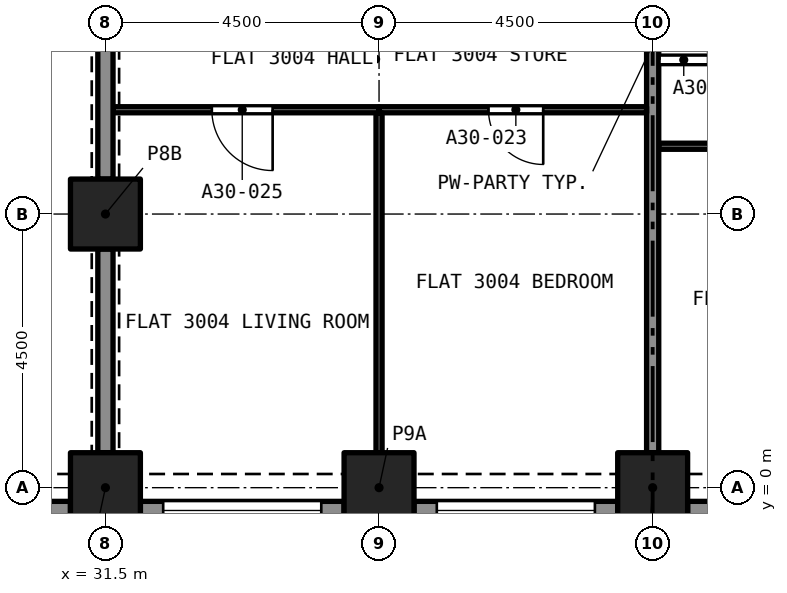
"""IFC4 building model, lengths in metres.
Left out: names, types, materials, properties, quantities, classifications, styles, units other than length and angle.
Written with IfcOpenShell. Run it as: python <this file> out.ifc"""

import sys

from ifc_helpers import new_model, si_unit, direction, frame, frame_2d, origin, origin_2d, place, context, subcontext, project, spatial, rectangle, extrude, element, fill, save


model = new_model("IFC4")
c1 = context("Model", 3, precision=1e-05, world=origin(), true_north=direction((0.0, 1.0)))
c2 = subcontext(c1, "Body", "Model", "MODEL_VIEW")
j1 = project(units=[si_unit("LENGTHUNIT", "METRE"), si_unit("PLANEANGLEUNIT", "RADIAN")], contexts=[c1])
p1 = place(None, origin())
s1 = spatial("IfcSite", under=j1, at=p1, CompositionType="ELEMENT")
p2 = place(p1, origin())
s2 = spatial("IfcBuilding", under=s1, at=p2, CompositionType="ELEMENT")
p3 = place(p2, frame((0.0, 0.0, 108.8)))
s3 = spatial("IfcBuildingStorey", under=s2, at=p3, CompositionType="ELEMENT", Elevation=108.8)
for number, where, z_axis, x_axis in (
    (1, (31.5, 0.0, 0.0), (0.0, 0.0, 1.0), (1.0, 0.0, 0.0)),
    (2, (36.0, 0.0, 0.0), (0.0, 0.0, 1.0), (1.0, 0.0, 0.0)),
    (3, (40.5, 0.0, 0.0), (0.0, 0.0, 1.0), (1.0, 0.0, 0.0)),
    (4, (31.5, 4.5, 0.0), (0.0, 0.0, 1.0), (1.0, 0.0, 0.0)),
):
    element("IfcColumn", number, at=place(p3, frame(where, z_axis=z_axis, x_axis=x_axis)), inside=s3, PredefinedType="COLUMN", context=c2, shape_type="SweptSolid", body=[
        extrude(rectangle(XDim=1.15, YDim=1.15, at=origin_2d()), origin(), (0.0, 0.0, 1.0), 3.2),
    ])
p4 = place(p3, frame((30.925, -0.375, 0.0), z_axis=(0.0, 0.0, 1.0), x_axis=(-1.0, 0.0, 0.0)))
e5 = element("IfcWall", 5, at=p4, inside=s3, PredefinedType="SOLIDWALL", context=c2, shape_type="SweptSolid", body=[
    extrude(rectangle(XDim=3.35, YDim=0.3, at=frame_2d((1.675, 0.0))), origin(), (0.0, 0.0, 1.0), 3.2),
])
p5 = place(p4, frame((0.375, 0.0, 0.45)))
e6 = element("IfcOpeningElement", 6, at=p5, cuts=e5, PredefinedType="OPENING", context=c2, shape_type="SweptSolid", body=[
    extrude(rectangle(XDim=2.6, YDim=1.95, at=frame_2d((1.3, 0.975))), frame((0.0, 0.16, 0.0), z_axis=(0.0, -1.0, 0.0), x_axis=(1.0, 0.0, 0.0)), (0.0, 0.0, 1.0), 0.32),
])
p6 = place(p3, frame((35.425, -0.375, 0.0), z_axis=(0.0, 0.0, 1.0), x_axis=(-1.0, 0.0, 0.0)))
e7 = element("IfcWall", 7, at=p6, inside=s3, PredefinedType="SOLIDWALL", context=c2, shape_type="SweptSolid", body=[
    extrude(rectangle(XDim=3.35, YDim=0.3, at=frame_2d((1.675, 0.0))), origin(), (0.0, 0.0, 1.0), 3.2),
])
p7 = place(p6, frame((0.375, 0.0, 0.45)))
e8 = element("IfcOpeningElement", 8, at=p7, cuts=e7, PredefinedType="OPENING", context=c2, shape_type="SweptSolid", body=[
    extrude(rectangle(XDim=2.6, YDim=1.95, at=frame_2d((1.3, 0.975))), frame((0.0, 0.16, 0.0), z_axis=(0.0, -1.0, 0.0), x_axis=(1.0, 0.0, 0.0)), (0.0, 0.0, 1.0), 0.32),
])
p8 = place(p3, frame((39.925, -0.375, 0.0), z_axis=(0.0, 0.0, 1.0), x_axis=(-1.0, 0.0, 0.0)))
e9 = element("IfcWall", 9, at=p8, inside=s3, PredefinedType="SOLIDWALL", context=c2, shape_type="SweptSolid", body=[
    extrude(rectangle(XDim=3.35, YDim=0.3, at=frame_2d((1.675, 0.0))), origin(), (0.0, 0.0, 1.0), 3.2),
])
p9 = place(p8, frame((0.375, 0.0, 0.45)))
e10 = element("IfcOpeningElement", 10, at=p9, cuts=e9, PredefinedType="OPENING", context=c2, shape_type="SweptSolid", body=[
    extrude(rectangle(XDim=2.6, YDim=1.95, at=frame_2d((1.3, 0.975))), frame((0.0, 0.16, 0.0), z_axis=(0.0, -1.0, 0.0), x_axis=(1.0, 0.0, 0.0)), (0.0, 0.0, 1.0), 0.32),
])
p10 = place(p3, frame((44.425, -0.375, 0.0), z_axis=(0.0, 0.0, 1.0), x_axis=(-1.0, 0.0, 0.0)))
e11 = element("IfcWall", 11, at=p10, inside=s3, PredefinedType="SOLIDWALL", context=c2, shape_type="SweptSolid", body=[
    extrude(rectangle(XDim=3.35, YDim=0.3, at=frame_2d((1.675, 0.0))), origin(), (0.0, 0.0, 1.0), 3.2),
])
p11 = place(p10, frame((0.375, 0.0, 0.45)))
e12 = element("IfcOpeningElement", 12, at=p11, cuts=e11, PredefinedType="OPENING", context=c2, shape_type="SweptSolid", body=[
    extrude(rectangle(XDim=2.6, YDim=1.95, at=frame_2d((1.3, 0.975))), frame((0.0, 0.16, 0.0), z_axis=(0.0, -1.0, 0.0), x_axis=(1.0, 0.0, 0.0)), (0.0, 0.0, 1.0), 0.32),
])
p12 = place(p3, frame((40.6, 7.035, 0.0), z_axis=(0.0, 0.0, 1.0), x_axis=(1.0, 0.0, 0.0)))
e13 = element("IfcWall", 13, at=p12, inside=s3, PredefinedType="PARTITIONING", context=c2, shape_type="SweptSolid", body=[
    extrude(rectangle(XDim=0.923, YDim=0.125, at=frame_2d((0.461, 0.0))), origin(), (0.0, 0.0, 1.0), 2.9),
])
p13 = place(p12, frame((0.011, 0.0, 0.0)))
e14 = element("IfcOpeningElement", 14, at=p13, cuts=e13, PredefinedType="OPENING", context=c2, shape_type="SweptSolid", body=[
    extrude(rectangle(XDim=0.8, YDim=2.1, at=frame_2d((0.4, 1.05))), frame((0.0, 0.073, 0.0), z_axis=(0.0, -1.0, 0.0), x_axis=(1.0, 0.0, 0.0)), (0.0, 0.0, 1.0), 0.145),
])
p14 = place(p3, frame((44.95, 5.615, 0.0), z_axis=(0.0, 0.0, 1.0), x_axis=(-1.0, 0.0, 0.0)))
e15 = element("IfcWall", 15, at=p14, inside=s3, PredefinedType="PARTITIONING", context=c2, shape_type="SweptSolid", body=[
    extrude(rectangle(XDim=4.35, YDim=0.1, at=frame_2d((2.175, 0.0))), origin(), (0.0, 0.0, 1.0), 2.9),
])
p15 = place(p14, frame((1.75, 0.0, 0.0)))
e16 = element("IfcOpeningElement", 16, at=p15, cuts=e15, PredefinedType="OPENING", context=c2, shape_type="SweptSolid", body=[
    extrude(rectangle(XDim=0.9, YDim=2.1, at=frame_2d((0.45, 1.05))), frame((0.0, 0.06, 0.0), z_axis=(0.0, -1.0, 0.0), x_axis=(1.0, 0.0, 0.0)), (0.0, 0.0, 1.0), 0.12),
])
p16 = place(p3, frame((40.5, 0.575, 0.0), z_axis=(0.0, 0.0, 1.0), x_axis=(0.0, 1.0, 0.0)))
e17 = element("IfcWall", 17, at=p16, inside=s3, PredefinedType="PARTITIONING", context=c2, shape_type="SweptSolid", body=[
    extrude(rectangle(XDim=13.425, YDim=0.2, at=frame_2d((6.712, 0.0))), origin(), (0.0, 0.0, 1.0), 2.9),
])
p17 = place(p3, frame((40.4, 6.215, 0.0), z_axis=(0.0, 0.0, 1.0), x_axis=(-1.0, 0.0, 0.0)))
e18 = element("IfcWall", 18, at=p17, inside=s3, PredefinedType="PARTITIONING", context=c2, shape_type="SweptSolid", body=[
    extrude(rectangle(XDim=4.4, YDim=0.1, at=frame_2d((2.2, 0.0))), origin(), (0.0, 0.0, 1.0), 2.9),
])
p18 = place(p17, frame((1.7, 0.0, 0.0)))
e19 = element("IfcOpeningElement", 19, at=p18, cuts=e18, PredefinedType="OPENING", context=c2, shape_type="SweptSolid", body=[
    extrude(rectangle(XDim=0.9, YDim=2.1, at=frame_2d((0.45, 1.05))), frame((0.0, 0.06, 0.0), z_axis=(0.0, -1.0, 0.0), x_axis=(1.0, 0.0, 0.0)), (0.0, 0.0, 1.0), 0.12),
])
p19 = place(p3, frame((36.0, 0.575, 0.0), z_axis=(0.0, 0.0, 1.0), x_axis=(0.0, 1.0, 0.0)))
e20 = element("IfcWall", 20, at=p19, inside=s3, PredefinedType="PARTITIONING", context=c2, shape_type="SweptSolid", body=[
    extrude(rectangle(XDim=5.59, YDim=0.1, at=frame_2d((2.795, 0.0))), origin(), (0.0, 0.0, 1.0), 2.9),
])
p20 = place(p3, frame((36.0, 6.215, 0.0), z_axis=(0.0, 0.0, 1.0), x_axis=(-1.0, 0.0, 0.0)))
e21 = element("IfcWall", 21, at=p20, inside=s3, PredefinedType="PARTITIONING", context=c2, shape_type="SweptSolid", body=[
    extrude(rectangle(XDim=4.375, YDim=0.1, at=frame_2d((2.188, 0.0))), origin(), (0.0, 0.0, 1.0), 2.9),
])
p21 = place(p20, frame((1.75, 0.0, 0.0)))
e22 = element("IfcOpeningElement", 22, at=p21, cuts=e21, PredefinedType="OPENING", context=c2, shape_type="SweptSolid", body=[
    extrude(rectangle(XDim=1.0, YDim=2.1, at=frame_2d((0.5, 1.05))), frame((0.0, 0.06, 0.0), z_axis=(0.0, -1.0, 0.0), x_axis=(1.0, 0.0, 0.0)), (0.0, 0.0, 1.0), 0.12),
])
for number, where, z_axis, x_axis in (
    (23, (31.5, 0.575, 0.0), (0.0, 0.0, 1.0), (0.0, 1.0, 0.0)),
    (24, (31.5, 5.075, 0.0), (0.0, 0.0, 1.0), (0.0, 1.0, 0.0)),
):
    element("IfcWall", number, at=place(p3, frame(where, z_axis=z_axis, x_axis=x_axis)), inside=s3, PredefinedType="PARTITIONING", context=c2, shape_type="SweptSolid", body=[
        extrude(rectangle(XDim=3.35, YDim=0.25, at=frame_2d((1.675, 0.0))), origin(), (0.0, 0.0, 1.0), 2.38),
    ])
p22 = place(p7, origin())
e25 = element("IfcWindow", 25, at=p22, inside=s3, PartitioningType="SINGLE_PANEL", PredefinedType="WINDOW", context=c2, shape_type="SweptSolid", body=[
    extrude(rectangle(XDim=2.6, YDim=1.95, at=frame_2d((1.3, 0.975))), frame((0.0, 0.03, 0.0), z_axis=(0.0, -1.0, 0.0), x_axis=(1.0, 0.0, 0.0)), (0.0, 0.0, 1.0), 0.06),
])
fill(e8, e25)
p23 = place(p9, origin())
e26 = element("IfcWindow", 26, at=p23, inside=s3, PartitioningType="SINGLE_PANEL", PredefinedType="WINDOW", context=c2, shape_type="SweptSolid", body=[
    extrude(rectangle(XDim=2.6, YDim=1.95, at=frame_2d((1.3, 0.975))), frame((0.0, 0.03, 0.0), z_axis=(0.0, -1.0, 0.0), x_axis=(1.0, 0.0, 0.0)), (0.0, 0.0, 1.0), 0.06),
])
fill(e10, e26)
p24 = place(p13, origin())
e27 = element("IfcDoor", 27, at=p24, inside=s3, OperationType="SINGLE_SWING_LEFT", PredefinedType="DOOR", context=c2, shape_type="SweptSolid", body=[
    extrude(rectangle(XDim=0.8, YDim=2.1, at=frame_2d((0.4, 1.05))), frame((0.0, 0.025, 0.0), z_axis=(0.0, -1.0, 0.0), x_axis=(1.0, 0.0, 0.0)), (0.0, 0.0, 1.0), 0.05),
])
fill(e14, e27)
p25 = place(p18, origin())
e28 = element("IfcDoor", 28, at=p25, inside=s3, OperationType="SINGLE_SWING_LEFT", PredefinedType="DOOR", context=c2, shape_type="SweptSolid", body=[
    extrude(rectangle(XDim=0.9, YDim=2.1, at=frame_2d((0.45, 1.05))), frame((0.0, 0.025, 0.0), z_axis=(0.0, -1.0, 0.0), x_axis=(1.0, 0.0, 0.0)), (0.0, 0.0, 1.0), 0.05),
])
fill(e19, e28)
p26 = place(p21, origin())
e29 = element("IfcDoor", 29, at=p26, inside=s3, OperationType="SINGLE_SWING_RIGHT", PredefinedType="DOOR", context=c2, shape_type="SweptSolid", body=[
    extrude(rectangle(XDim=1.0, YDim=2.1, at=frame_2d((0.5, 1.05))), frame((0.0, 0.025, 0.0), z_axis=(0.0, -1.0, 0.0), x_axis=(1.0, 0.0, 0.0)), (0.0, 0.0, 1.0), 0.05),
])
fill(e22, e29)
save(model, sys.argv[1])
